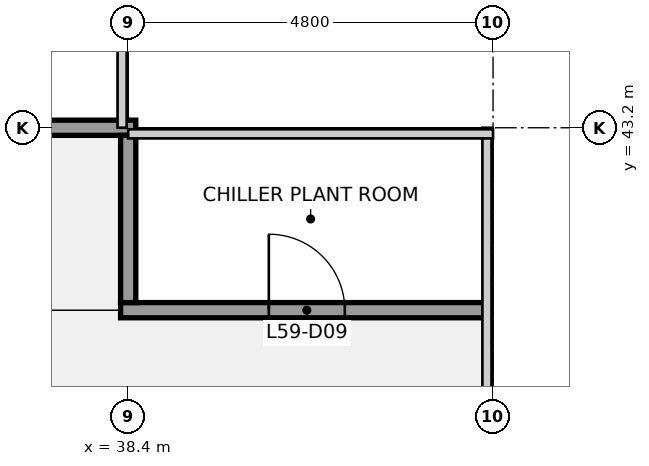
"""IFC4 building model, lengths in metres.
Left out: names, types, materials, properties, quantities, classifications, styles, units other than length and angle.
Written with IfcOpenShell. Run it as: python <this file> out.ifc"""

import sys

from ifc_helpers import new_model, si_unit, direction, frame, frame_2d, origin, place, context, subcontext, project, spatial, rectangle, extrude, element, fill, save


model = new_model("IFC4")
c1 = context("Model", 3, precision=1e-05, world=origin(), true_north=direction((0.0, 1.0)))
c2 = subcontext(c1, "Body", "Model", "MODEL_VIEW")
j1 = project(units=[si_unit("LENGTHUNIT", "METRE"), si_unit("PLANEANGLEUNIT", "RADIAN")], contexts=[c1])
p1 = place(None, origin())
s1 = spatial("IfcSite", under=j1, at=p1, CompositionType="ELEMENT")
p2 = place(p1, origin())
s2 = spatial("IfcBuilding", under=s1, at=p2, CompositionType="ELEMENT")
p3 = place(p2, frame((0.0, 0.0, 265.2)))
s3 = spatial("IfcBuildingStorey", under=s2, at=p3, CompositionType="ELEMENT", Elevation=265.2)
p4 = place(p3, frame((38.3, 40.8, 0.0), z_axis=(0.0, 0.0, 1.0), x_axis=(1.0, 0.0, 0.0)))
e1 = element("IfcWall", 1, at=p4, inside=s3, PredefinedType="PARTITIONING", context=c2, shape_type="SweptSolid", body=[
    extrude(rectangle(XDim=4.8, YDim=0.2, at=frame_2d((2.4, 0.0))), origin(), (0.0, 0.0, 1.0), 2.993),
])
p5 = place(p4, frame((1.95, 0.0, 0.0)))
e2 = element("IfcOpeningElement", 2, at=p5, cuts=e1, PredefinedType="OPENING", context=c2, shape_type="SweptSolid", body=[
    extrude(rectangle(XDim=1.0, YDim=2.1, at=frame_2d((0.5, 1.05))), frame((0.0, 0.11, 0.0), z_axis=(0.0, -1.0, 0.0), x_axis=(1.0, 0.0, 0.0)), (0.0, 0.0, 1.0), 0.22),
])
p6 = place(p3, frame((19.1, 43.2, 0.0), z_axis=(0.0, 0.0, 1.0), x_axis=(1.0, 0.0, 0.0)))
e3 = element("IfcWall", 3, at=p6, inside=s3, PredefinedType="PARTITIONING", context=c2, shape_type="SweptSolid", body=[
    extrude(rectangle(XDim=19.4, YDim=0.2, at=frame_2d((9.7, 0.0))), origin(), (0.0, 0.0, 1.0), 2.993),
])
p7 = place(p6, frame((4.4, 0.0, 0.0)))
e4 = element("IfcOpeningElement", 4, at=p7, cuts=e3, PredefinedType="OPENING", context=c2, shape_type="SweptSolid", body=[
    extrude(rectangle(XDim=1.0, YDim=2.1, at=frame_2d((0.5, 1.05))), frame((0.0, 0.11, 0.0), z_axis=(0.0, -1.0, 0.0), x_axis=(1.0, 0.0, 0.0)), (0.0, 0.0, 1.0), 0.22),
])
p8 = place(p6, frame((11.6, 0.0, 0.0)))
e5 = element("IfcOpeningElement", 5, at=p8, cuts=e3, PredefinedType="OPENING", context=c2, shape_type="SweptSolid", body=[
    extrude(rectangle(XDim=1.0, YDim=2.1, at=frame_2d((0.5, 1.05))), frame((0.0, 0.11, 0.0), z_axis=(0.0, -1.0, 0.0), x_axis=(1.0, 0.0, 0.0)), (0.0, 0.0, 1.0), 0.22),
])
p9 = place(p6, frame((16.4, 0.0, 0.0)))
e6 = element("IfcOpeningElement", 6, at=p9, cuts=e3, PredefinedType="OPENING", context=c2, shape_type="SweptSolid", body=[
    extrude(rectangle(XDim=1.0, YDim=2.1, at=frame_2d((0.5, 1.05))), frame((0.0, 0.11, 0.0), z_axis=(0.0, -1.0, 0.0), x_axis=(1.0, 0.0, 0.0)), (0.0, 0.0, 1.0), 0.22),
])
p10 = place(p3, frame((38.4, 40.9, 0.0), z_axis=(0.0, 0.0, 1.0), x_axis=(0.0, 1.0, 0.0)))
e7 = element("IfcWall", 7, at=p10, inside=s3, PredefinedType="PARTITIONING", context=c2, shape_type="SweptSolid", body=[
    extrude(rectangle(XDim=2.2, YDim=0.2, at=frame_2d((1.1, 0.0))), origin(), (0.0, 0.0, 1.0), 2.993),
])
p11 = place(p5, origin())
e8 = element("IfcDoor", 8, at=p11, inside=s3, OperationType="SINGLE_SWING_LEFT", PredefinedType="DOOR", context=c2, shape_type="SweptSolid", body=[
    extrude(rectangle(XDim=1.0, YDim=2.1, at=frame_2d((0.5, 1.05))), frame((0.0, 0.025, 0.0), z_axis=(0.0, -1.0, 0.0), x_axis=(1.0, 0.0, 0.0)), (0.0, 0.0, 1.0), 0.05),
])
fill(e2, e8)
save(model, sys.argv[1])
